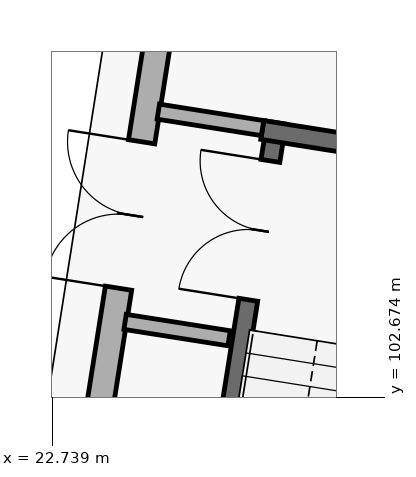
"""IFC4 building model, lengths in metres.
Left out: names, types, materials, properties, quantities, classifications, styles, units other than length and angle.
Written with IfcOpenShell. Run it as: python <this file> out.ifc"""

import sys

from ifc_helpers import new_model, si_unit, direction, frame, frame_2d, origin, place, context, subcontext, project, spatial, rectangle, extrude, element, fill, save


model = new_model("IFC4")
c1 = context("Model", 3, precision=1e-05, world=origin(), true_north=direction((0.0, 1.0)))
c2 = subcontext(c1, "Body", "Model", "MODEL_VIEW")
j1 = project(units=[si_unit("LENGTHUNIT", "METRE"), si_unit("PLANEANGLEUNIT", "RADIAN")], contexts=[c1])
p1 = place(None, origin())
s1 = spatial("IfcSite", under=j1, at=p1, CompositionType="ELEMENT")
p2 = place(p1, origin())
s2 = spatial("IfcBuilding", under=s1, at=p2, CompositionType="ELEMENT")
p3 = place(p2, origin())
s3 = spatial("IfcBuildingStorey", under=s2, at=p3, CompositionType="ELEMENT", Elevation=0.0)
p4 = place(p3, frame((21.783, 92.525, 0.0), z_axis=(0.0, 0.0, 1.0), x_axis=(0.155972645656, 0.987761374932, 0.0)))
e1 = element("IfcWall", 1, at=p4, inside=s3, PredefinedType="STANDARD", context=c2, shape_type="SweptSolid", body=[
    extrude(rectangle(XDim=18.671, YDim=0.35, at=frame_2d((9.335, 0.0))), origin(), (0.0, 0.0, 1.0), 4.165),
])
p5 = place(p4, frame((11.73, 0.0, 0.0)))
e2 = element("IfcOpeningElement", 2, at=p5, cuts=e1, PredefinedType="OPENING", context=c2, shape_type="SweptSolid", body=[
    extrude(rectangle(XDim=1.95, YDim=2.25, at=frame_2d((0.975, 1.125))), frame((0.0, 0.185, 0.0), z_axis=(0.0, -1.0, 0.0), x_axis=(1.0, 0.0, 0.0)), (0.0, 0.0, 1.0), 0.37),
])
p6 = place(p4, frame((1.114, 0.0, 0.0)))
e3 = element("IfcOpeningElement", 3, at=p6, cuts=e1, PredefinedType="OPENING", context=c2, shape_type="SweptSolid", body=[
    extrude(rectangle(XDim=3.0, YDim=2.55, at=frame_2d((1.5, 1.275))), frame((0.0, 0.185, 0.0), z_axis=(0.0, -1.0, 0.0), x_axis=(1.0, 0.0, 0.0)), (0.0, 0.0, 1.0), 0.37),
])
p7 = place(p3, frame((24.189, 96.858, 0.0), z_axis=(0.0, 0.0, 1.0), x_axis=(0.157272580499, 0.987555231581, 0.0)))
e4 = element("IfcWall", 4, at=p7, inside=s3, PredefinedType="SHEAR", context=c2, shape_type="SweptSolid", body=[
    extrude(rectangle(XDim=9.55, YDim=0.25, at=frame_2d((4.775, 0.0))), origin(), (0.0, 0.0, 1.0), 5.1),
])
p8 = place(p7, frame((7.19, 0.0, 0.0)))
e5 = element("IfcOpeningElement", 5, at=p8, cuts=e4, PredefinedType="OPENING", context=c2, shape_type="SweptSolid", body=[
    extrude(rectangle(XDim=1.85, YDim=2.3, at=frame_2d((0.925, 1.15))), frame((0.0, 0.135, 0.0), z_axis=(0.0, -1.0, 0.0), x_axis=(1.0, 0.0, 0.0)), (0.0, 0.0, 1.0), 0.27),
])
p9 = place(p3, frame((29.711, 105.523, 0.0), z_axis=(0.0, 0.0, 1.0), x_axis=(-0.987548759282, 0.157313216355, 0.0)))
e6 = element("IfcWall", 6, at=p9, inside=s3, PredefinedType="SHEAR", context=c2, shape_type="SweptSolid", body=[
    extrude(rectangle(XDim=4.26, YDim=0.25, at=frame_2d((2.13, 0.0))), origin(), (0.0, 0.0, 1.0), 5.1),
])
p10 = place(p9, frame((1.23, 0.0, 0.0)))
e7 = element("IfcOpeningElement", 7, at=p10, cuts=e6, PredefinedType="OPENING", context=c2, shape_type="SweptSolid", body=[
    extrude(rectangle(XDim=1.8, YDim=2.25, at=frame_2d((0.9, 1.125))), frame((0.0, 0.135, 0.0), z_axis=(0.0, -1.0, 0.0), x_axis=(1.0, 0.0, 0.0)), (0.0, 0.0, 1.0), 0.27),
])
p11 = place(p3, frame((25.508, 106.218, 0.0), z_axis=(0.0, 0.0, 1.0), x_axis=(-0.987768665993, 0.155926464982, 0.0)))
e8 = element("IfcWall", 8, at=p11, inside=s3, PredefinedType="PARTITIONING", context=c2, shape_type="SweptSolid", body=[
    extrude(rectangle(XDim=1.389, YDim=0.2, at=frame_2d((0.694, 0.0))), origin(), (0.0, 0.0, 1.0), 4.165),
])
p12 = place(p3, frame((25.067, 103.452, 0.0), z_axis=(0.0, 0.0, 1.0), x_axis=(-0.987817205995, 0.155618660641, 0.0)))
e9 = element("IfcWall", 9, at=p12, inside=s3, PredefinedType="PARTITIONING", context=c2, shape_type="SweptSolid", body=[
    extrude(rectangle(XDim=1.385, YDim=0.2, at=frame_2d((0.693, 0.0))), origin(), (0.0, 0.0, 1.0), 4.165),
])
p13 = place(p5, origin())
e10 = element("IfcDoor", 10, at=p13, inside=s3, OperationType="DOUBLE_DOOR_SINGLE_SWING", PredefinedType="DOOR", context=c2, shape_type="SweptSolid", body=[
    extrude(rectangle(XDim=1.95, YDim=2.25, at=frame_2d((0.975, 1.125))), frame((0.0, 0.025, 0.0), z_axis=(0.0, -1.0, 0.0), x_axis=(1.0, 0.0, 0.0)), (0.0, 0.0, 1.0), 0.05),
])
fill(e2, e10)
p14 = place(p8, origin())
e11 = element("IfcDoor", 11, at=p14, inside=s3, OperationType="DOUBLE_DOOR_SINGLE_SWING", PredefinedType="DOOR", context=c2, shape_type="SweptSolid", body=[
    extrude(rectangle(XDim=1.85, YDim=2.3, at=frame_2d((0.925, 1.15))), frame((0.0, 0.025, 0.0), z_axis=(0.0, -1.0, 0.0), x_axis=(1.0, 0.0, 0.0)), (0.0, 0.0, 1.0), 0.05),
])
fill(e5, e11)
save(model, sys.argv[1])
